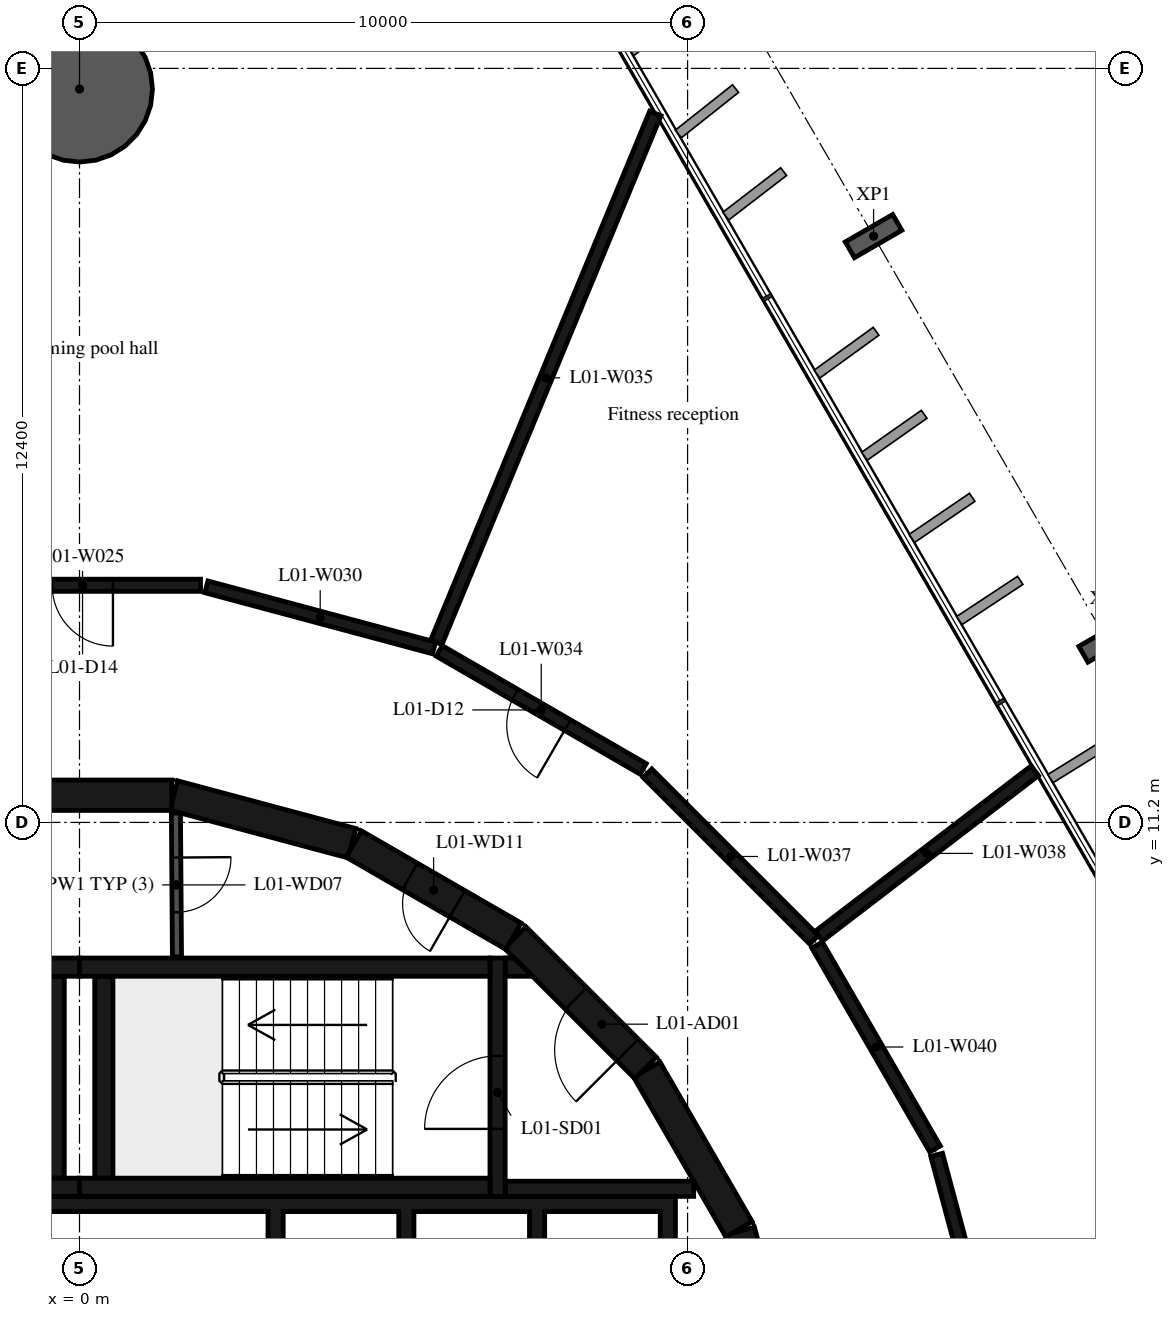
"""IFC4 building model, lengths in metres.
Left out: names, types, materials, properties, quantities, classifications, styles, units other than length and angle.
Written with IfcOpenShell. Run it as: python <this file> out.ifc"""

import sys

from ifc_helpers import new_model, si_unit, direction, frame, frame_2d, origin, origin_2d, place, context, subcontext, project, spatial, polyline, rectangle, hollow_circle, i_section, outline, extrude, element, fill, save


model = new_model("IFC4")
c1 = context("Model", 3, precision=1e-05, world=origin(), true_north=direction((0.0, 1.0)))
c2 = subcontext(c1, "Body", "Model", "MODEL_VIEW")
j1 = project(units=[si_unit("LENGTHUNIT", "METRE"), si_unit("PLANEANGLEUNIT", "RADIAN")], contexts=[c1])
p1 = place(None, origin())
s1 = spatial("IfcSite", under=j1, at=p1, CompositionType="ELEMENT")
p2 = place(p1, origin())
s2 = spatial("IfcBuilding", under=s1, at=p2, CompositionType="ELEMENT")
p3 = place(p2, frame((0.0, 0.0, 9.0)))
s3 = spatial("IfcBuildingStorey", under=s2, at=p3, CompositionType="ELEMENT", Elevation=9.0)
p4 = place(p3, frame((0.0, 23.26, -0.38), z_axis=(0.0, 0.0, 1.0), x_axis=(1.0, 0.0, 0.0)))
e1 = element("IfcColumn", 1, at=p4, inside=s3, PredefinedType="COLUMN", context=c2, shape_type="SweptSolid", body=[
    extrude(hollow_circle(Radius=1.2, WallThickness=0.06, at=origin_2d()), origin(), (0.0, 0.0, 1.0), 4.8),
])
for number, where, z_axis, x_axis in (
    (2, (16.899, 14.19, -0.38), (0.0, 0.0, 1.0), (0.5, -0.866, 0.0)),
    (3, (13.059, 20.842, -0.38), (0.0, 0.0, 1.0), (0.5, -0.866, 0.0)),
):
    element("IfcColumn", number, at=place(p3, frame(where, z_axis=z_axis, x_axis=x_axis)), inside=s3, PredefinedType="COLUMN", context=c2, shape_type="SweptSolid", body=[
        extrude(i_section(OverallWidth=0.3, OverallDepth=0.9, WebThickness=0.019, FlangeThickness=0.035, FilletRadius=0.03, at=origin_2d()), origin(), (0.0, 0.0, 1.0), 4.8),
    ])
for number, where, z_axis, x_axis in (
    (4, (11.643, 1.55, 0.0), (0.0, 0.0, 1.0), (-0.259, 0.966, 0.0)),
    (5, (10.845, 4.51, 0.0), (0.0, 0.0, 1.0), (-0.5, 0.866, 0.0)),
):
    element("IfcWall", number, at=place(p3, frame(where, z_axis=z_axis, x_axis=x_axis)), inside=s3, PredefinedType="SHEAR", context=c2, shape_type="SweptSolid", body=[
        extrude(rectangle(XDim=3.033, YDim=0.5, at=frame_2d((1.516, 0.0))), origin(), (0.0, 0.0, 1.0), 4.42),
    ])
p5 = place(p3, frame((9.308, 7.164, 0.0), z_axis=(0.0, 0.0, 1.0), x_axis=(-0.707106781187, 0.707106781187, 0.0)))
e6 = element("IfcWall", 6, at=p5, inside=s3, PredefinedType="SHEAR", context=c2, shape_type="SweptSolid", body=[
    extrude(rectangle(XDim=3.032, YDim=0.5, at=frame_2d((1.516, 0.0))), origin(), (0.0, 0.0, 1.0), 4.42),
])
p6 = place(p5, frame((0.416, 0.0, 0.0)))
e7 = element("IfcOpeningElement", 7, at=p6, cuts=e6, PredefinedType="OPENING", context=c2, shape_type="SweptSolid", body=[
    extrude(rectangle(XDim=1.2, YDim=2.1, at=frame_2d((0.6, 1.05))), frame((0.0, 0.26, 0.0), z_axis=(0.0, -1.0, 0.0), x_axis=(1.0, 0.0, 0.0)), (0.0, 0.0, 1.0), 0.52),
])
p7 = place(p3, frame((7.137, 9.329, 0.0), z_axis=(0.0, 0.0, 1.0), x_axis=(-0.865975092491, 0.500087131594, 0.0)))
e8 = element("IfcWall", 8, at=p7, inside=s3, PredefinedType="SHEAR", context=c2, shape_type="SweptSolid", body=[
    extrude(rectangle(XDim=3.033, YDim=0.5, at=frame_2d((1.516, 0.0))), origin(), (0.0, 0.0, 1.0), 4.42),
])
p8 = place(p7, frame((1.066, 0.0, 0.0)))
e9 = element("IfcOpeningElement", 9, at=p8, cuts=e8, PredefinedType="OPENING", context=c2, shape_type="SweptSolid", body=[
    extrude(rectangle(XDim=0.9, YDim=2.1, at=frame_2d((0.45, 1.05))), frame((0.0, 0.26, 0.0), z_axis=(0.0, -1.0, 0.0), x_axis=(1.0, 0.0, 0.0)), (0.0, 0.0, 1.0), 0.52),
])
for number, where, z_axis, x_axis in (
    (10, (4.479, 10.858, 0.0), (0.0, 0.0, 1.0), (-0.966, 0.259, 0.0)),
    (11, (1.516, 11.647, 0.0), (0.0, 0.0, 1.0), (-1.0, 0.0, 0.0)),
):
    element("IfcWall", number, at=place(p3, frame(where, z_axis=z_axis, x_axis=x_axis)), inside=s3, PredefinedType="SHEAR", context=c2, shape_type="SweptSolid", body=[
        extrude(rectangle(XDim=3.033, YDim=0.5, at=frame_2d((1.516, 0.0))), origin(), (0.0, 0.0, 1.0), 4.42),
    ])
for number, where, z_axis, x_axis in (
    (12, (0.0, 5.2, 0.0), (0.0, 0.0, 1.0), (1.0, 0.0, 0.0)),
    (13, (0.0, 8.82, 0.0), (0.0, 0.0, 1.0), (1.0, 0.0, 0.0)),
):
    element("IfcWall", number, at=place(p3, frame(where, z_axis=z_axis, x_axis=x_axis)), inside=s3, PredefinedType="SHEAR", context=c2, shape_type="SweptSolid", body=[
        extrude(rectangle(XDim=6.75, YDim=0.3, at=frame_2d((3.375, 0.0))), origin(), (0.0, 0.0, 1.0), 4.42),
    ])
p9 = place(p3, frame((0.4, 5.35, 0.0), z_axis=(0.0, 0.0, 1.0), x_axis=(0.0, 1.0, 0.0)))
e14 = element("IfcWall", 14, at=p9, inside=s3, PredefinedType="SHEAR", context=c2, shape_type="SweptSolid", body=[
    extrude(rectangle(XDim=3.32, YDim=0.3, at=frame_2d((1.66, 0.0))), origin(), (0.0, 0.0, 1.0), 4.42),
])
p10 = place(p3, frame((6.875, 5.05, 0.0), z_axis=(0.0, 0.0, 1.0), x_axis=(0.0, 1.0, 0.0)))
e15 = element("IfcWall", 15, at=p10, inside=s3, PredefinedType="SHEAR", context=c2, shape_type="SweptSolid", body=[
    extrude(rectangle(XDim=3.92, YDim=0.25, at=frame_2d((1.96, 0.0))), origin(), (0.0, 0.0, 1.0), 4.42),
])
p11 = place(p10, frame((1.11, 0.0, 0.0)))
e16 = element("IfcOpeningElement", 16, at=p11, cuts=e15, PredefinedType="OPENING", context=c2, shape_type="SweptSolid", body=[
    extrude(rectangle(XDim=1.2, YDim=2.1, at=frame_2d((0.6, 1.05))), frame((0.0, 0.135, 0.0), z_axis=(0.0, -1.0, 0.0), x_axis=(1.0, 0.0, 0.0)), (0.0, 0.0, 1.0), 0.27),
])
p12 = place(p3, frame((7.0, 5.175, 0.0), z_axis=(0.0, 0.0, 1.0), x_axis=(1.0, 0.0, 0.0)))
e17 = element("IfcWall", 17, at=p12, inside=s3, PredefinedType="SHEAR", context=c2, shape_type="SweptSolid", body=[
    extrude(rectangle(XDim=3.1, YDim=0.25, at=frame_2d((1.55, 0.0))), origin(), (0.0, 0.0, 1.0), 4.42),
])
p13 = place(p3, origin())
e18 = element("IfcWall", 18, at=p13, inside=s3, PredefinedType="SHEAR", context=c2, shape_type="SweptSolid", body=[
    extrude(outline(polyline([(7.448, 8.67), (7.0, 8.67), (7.0, 8.97), (7.148, 8.97), (7.448, 8.67)])), origin(), (0.0, 0.0, 1.0), 4.42),
])
for number, where, z_axis, x_axis in (
    (19, (-6.75, 5.2, 0.0), (0.0, 0.0, 1.0), (1.0, 0.0, 0.0)),
    (20, (-6.75, 8.82, 0.0), (0.0, 0.0, 1.0), (1.0, 0.0, 0.0)),
):
    element("IfcWall", number, at=place(p3, frame(where, z_axis=z_axis, x_axis=x_axis)), inside=s3, PredefinedType="SHEAR", context=c2, shape_type="SweptSolid", body=[
        extrude(rectangle(XDim=6.75, YDim=0.3, at=frame_2d((3.375, 0.0))), origin(), (0.0, 0.0, 1.0), 4.42),
    ])
p14 = place(p3, frame((-0.4, 5.35, 0.0), z_axis=(0.0, 0.0, 1.0), x_axis=(0.0, 1.0, 0.0)))
e21 = element("IfcWall", 21, at=p14, inside=s3, PredefinedType="SHEAR", context=c2, shape_type="SweptSolid", body=[
    extrude(rectangle(XDim=3.32, YDim=0.3, at=frame_2d((1.66, 0.0))), origin(), (0.0, 0.0, 1.0), 4.42),
])
p15 = place(p3, origin())
e22 = element("IfcWall", 22, at=p15, inside=s3, PredefinedType="SHEAR", context=c2, shape_type="SweptSolid", body=[
    extrude(outline(polyline([(-9.55, 4.8), (-7.65, 4.8), (-7.65, 1.9), (-7.4, 1.9), (-7.4, 4.8), (-5.5, 4.8), (-5.5, 1.9), (-5.25, 1.9), (-5.25, 4.8), (-3.35, 4.8), (-3.35, 1.9), (-3.1, 1.9), (-3.1, 4.8), (-1.2, 4.8), (-1.2, 1.9), (-0.95, 1.9), (-0.95, 4.8), (3.1, 4.8), (3.1, 1.9), (3.35, 1.9), (3.35, 4.8), (5.25, 4.8), (5.25, 1.9), (5.5, 1.9), (5.5, 4.8), (7.4, 4.8), (7.4, 1.9), (7.65, 1.9), (7.65, 4.8), (9.55, 4.8), (9.55, 1.9), (9.8, 1.9), (9.8, 4.8), (9.8, 5.05), (-9.8, 5.05), (-9.8, 4.8), (-9.8, 1.9), (-9.55, 1.9), (-9.55, 4.8)])), origin(), (0.0, 0.0, 1.0), 4.42),
])
p16 = place(p3, frame((1.586, 11.354, 0.0), z_axis=(0.0, 0.0, 1.0), x_axis=(0.007227482881, -0.999973881405, 0.0)))
e23 = element("IfcWall", 23, at=p16, inside=s3, PredefinedType="PARTITIONING", context=c2, shape_type="SweptSolid", body=[
    extrude(rectangle(XDim=2.365, YDim=0.15, at=frame_2d((1.182, 0.0))), origin(), (0.0, 0.0, 1.0), 4.42),
])
p17 = place(p16, frame((0.732, 0.0, 0.0)))
e24 = element("IfcOpeningElement", 24, at=p17, cuts=e23, PredefinedType="OPENING", context=c2, shape_type="SweptSolid", body=[
    extrude(rectangle(XDim=0.9, YDim=2.1, at=frame_2d((0.45, 1.05))), frame((0.0, 0.085, 0.0), z_axis=(0.0, -1.0, 0.0), x_axis=(1.0, 0.0, 0.0)), (0.0, 0.0, 1.0), 0.17),
])
p18 = place(p3, frame((1.99, 15.1, 0.0), z_axis=(0.0, 0.0, 1.0), x_axis=(-1.0, 0.0, 0.0)))
e25 = element("IfcWall", 25, at=p18, inside=s3, PredefinedType="PARTITIONING", context=c2, shape_type="SweptSolid", body=[
    extrude(rectangle(XDim=3.88, YDim=0.2, at=frame_2d((1.94, 0.0))), origin(), (0.0, 0.0, 1.0), 4.42),
])
p19 = place(p18, frame((1.44, 0.0, 0.0)))
e26 = element("IfcOpeningElement", 26, at=p19, cuts=e25, PredefinedType="OPENING", context=c2, shape_type="SweptSolid", body=[
    extrude(rectangle(XDim=1.0, YDim=2.1, at=frame_2d((0.5, 1.05))), frame((0.0, 0.11, 0.0), z_axis=(0.0, -1.0, 0.0), x_axis=(1.0, 0.0, 0.0)), (0.0, 0.0, 1.0), 0.22),
])
p20 = place(p3, frame((5.83, 14.07, 0.0), z_axis=(0.0, 0.0, 1.0), x_axis=(-0.965870133458, 0.259026804199, 0.0)))
e27 = element("IfcWall", 27, at=p20, inside=s3, PredefinedType="PARTITIONING", context=c2, shape_type="SweptSolid", body=[
    extrude(rectangle(XDim=3.876, YDim=0.2, at=frame_2d((1.938, 0.0))), origin(), (0.0, 0.0, 1.0), 4.42),
])
p21 = place(p3, frame((9.27, 12.08, 0.0), z_axis=(0.0, 0.0, 1.0), x_axis=(-0.865601686425, 0.500733182901, 0.0)))
e28 = element("IfcWall", 28, at=p21, inside=s3, PredefinedType="PARTITIONING", context=c2, shape_type="SweptSolid", body=[
    extrude(rectangle(XDim=3.874, YDim=0.2, at=frame_2d((1.937, 0.0))), origin(), (0.0, 0.0, 1.0), 4.42),
])
p22 = place(p21, frame((1.437, 0.0, 0.0)))
e29 = element("IfcOpeningElement", 29, at=p22, cuts=e28, PredefinedType="OPENING", context=c2, shape_type="SweptSolid", body=[
    extrude(rectangle(XDim=1.0, YDim=2.1, at=frame_2d((0.5, 1.05))), frame((0.0, 0.11, 0.0), z_axis=(0.0, -1.0, 0.0), x_axis=(1.0, 0.0, 0.0)), (0.0, 0.0, 1.0), 0.22),
])
p23 = place(p3, frame((9.47, 22.86, 0.0), z_axis=(0.0, 0.0, 1.0), x_axis=(-0.382599926304, -0.923914117433, 0.0)))
e30 = element("IfcWall", 30, at=p23, inside=s3, PredefinedType="PARTITIONING", context=c2, shape_type="SweptSolid", body=[
    extrude(rectangle(XDim=9.414, YDim=0.2, at=frame_2d((4.707, 0.0))), origin(), (0.0, 0.0, 1.0), 4.42),
])
p24 = place(p3, frame((12.08, 9.27, 0.0), z_axis=(0.0, 0.0, 1.0), x_axis=(-0.707106781187, 0.707106781187, 0.0)))
e31 = element("IfcWall", 31, at=p24, inside=s3, PredefinedType="PARTITIONING", context=c2, shape_type="SweptSolid", body=[
    extrude(rectangle(XDim=3.874, YDim=0.2, at=frame_2d((1.937, 0.0))), origin(), (0.0, 0.0, 1.0), 4.42),
])
p25 = place(p3, frame((12.159, 9.331, 0.0), z_axis=(0.0, 0.0, 1.0), x_axis=(0.793912908327, 0.608031490954, 0.0)))
e32 = element("IfcWall", 32, at=p25, inside=s3, PredefinedType="PARTITIONING", context=c2, shape_type="SweptSolid", body=[
    extrude(rectangle(XDim=4.472, YDim=0.2, at=frame_2d((2.236, 0.0))), origin(), (0.0, 0.0, 1.0), 4.42),
])
p26 = place(p3, frame((14.07, 5.83, 0.0), z_axis=(0.0, 0.0, 1.0), x_axis=(-0.500760497952, 0.865585884642, 0.0)))
e33 = element("IfcWall", 33, at=p26, inside=s3, PredefinedType="PARTITIONING", context=c2, shape_type="SweptSolid", body=[
    extrude(rectangle(XDim=3.874, YDim=0.2, at=frame_2d((1.937, 0.0))), origin(), (0.0, 0.0, 1.0), 4.42),
])
p27 = place(p3, frame((15.074, 2.087, 0.0), z_axis=(0.0, 0.0, 1.0), x_axis=(-0.259038819442, 0.965866911133, 0.0)))
e34 = element("IfcWall", 34, at=p27, inside=s3, PredefinedType="PARTITIONING", context=c2, shape_type="SweptSolid", body=[
    extrude(rectangle(XDim=3.776, YDim=0.2, at=frame_2d((1.888, 0.0))), origin(), (0.0, 0.0, 1.0), 4.42),
])
p28 = place(p11, origin())
e35 = element("IfcDoor", 35, at=p28, inside=s3, OperationType="SINGLE_SWING_LEFT", PredefinedType="DOOR", context=c2, shape_type="SweptSolid", body=[
    extrude(rectangle(XDim=1.2, YDim=2.1, at=frame_2d((0.6, 1.05))), frame((0.0, 0.025, 0.0), z_axis=(0.0, -1.0, 0.0), x_axis=(1.0, 0.0, 0.0)), (0.0, 0.0, 1.0), 0.05),
])
fill(e16, e35)
p29 = place(p6, origin())
e36 = element("IfcDoor", 36, at=p29, inside=s3, OperationType="SINGLE_SWING_RIGHT", PredefinedType="DOOR", context=c2, shape_type="SweptSolid", body=[
    extrude(rectangle(XDim=1.2, YDim=2.1, at=frame_2d((0.6, 1.05))), frame((0.0, 0.025, 0.0), z_axis=(0.0, -1.0, 0.0), x_axis=(1.0, 0.0, 0.0)), (0.0, 0.0, 1.0), 0.05),
])
fill(e7, e36)
p30 = place(p17, origin())
e37 = element("IfcDoor", 37, at=p30, inside=s3, OperationType="SINGLE_SWING_RIGHT", PredefinedType="DOOR", context=c2, shape_type="SweptSolid", body=[
    extrude(rectangle(XDim=0.9, YDim=2.1, at=frame_2d((0.45, 1.05))), frame((0.0, 0.025, 0.0), z_axis=(0.0, -1.0, 0.0), x_axis=(1.0, 0.0, 0.0)), (0.0, 0.0, 1.0), 0.05),
])
fill(e24, e37)
p31 = place(p8, origin())
e38 = element("IfcDoor", 38, at=p31, inside=s3, OperationType="SINGLE_SWING_RIGHT", PredefinedType="DOOR", context=c2, shape_type="SweptSolid", body=[
    extrude(rectangle(XDim=0.9, YDim=2.1, at=frame_2d((0.45, 1.05))), frame((0.0, 0.025, 0.0), z_axis=(0.0, -1.0, 0.0), x_axis=(1.0, 0.0, 0.0)), (0.0, 0.0, 1.0), 0.05),
])
fill(e9, e38)
p32 = place(p22, origin())
e39 = element("IfcDoor", 39, at=p32, inside=s3, OperationType="SINGLE_SWING_LEFT", PredefinedType="DOOR", context=c2, shape_type="SweptSolid", body=[
    extrude(rectangle(XDim=1.0, YDim=2.1, at=frame_2d((0.5, 1.05))), frame((0.0, 0.025, 0.0), z_axis=(0.0, -1.0, 0.0), x_axis=(1.0, 0.0, 0.0)), (0.0, 0.0, 1.0), 0.05),
])
fill(e29, e39)
p33 = place(p19, origin())
e40 = element("IfcDoor", 40, at=p33, inside=s3, OperationType="SINGLE_SWING_LEFT", PredefinedType="DOOR", context=c2, shape_type="SweptSolid", body=[
    extrude(rectangle(XDim=1.0, YDim=2.1, at=frame_2d((0.5, 1.05))), frame((0.0, 0.025, 0.0), z_axis=(0.0, -1.0, 0.0), x_axis=(1.0, 0.0, 0.0)), (0.0, 0.0, 1.0), 0.05),
])
fill(e26, e40)
save(model, sys.argv[1])
